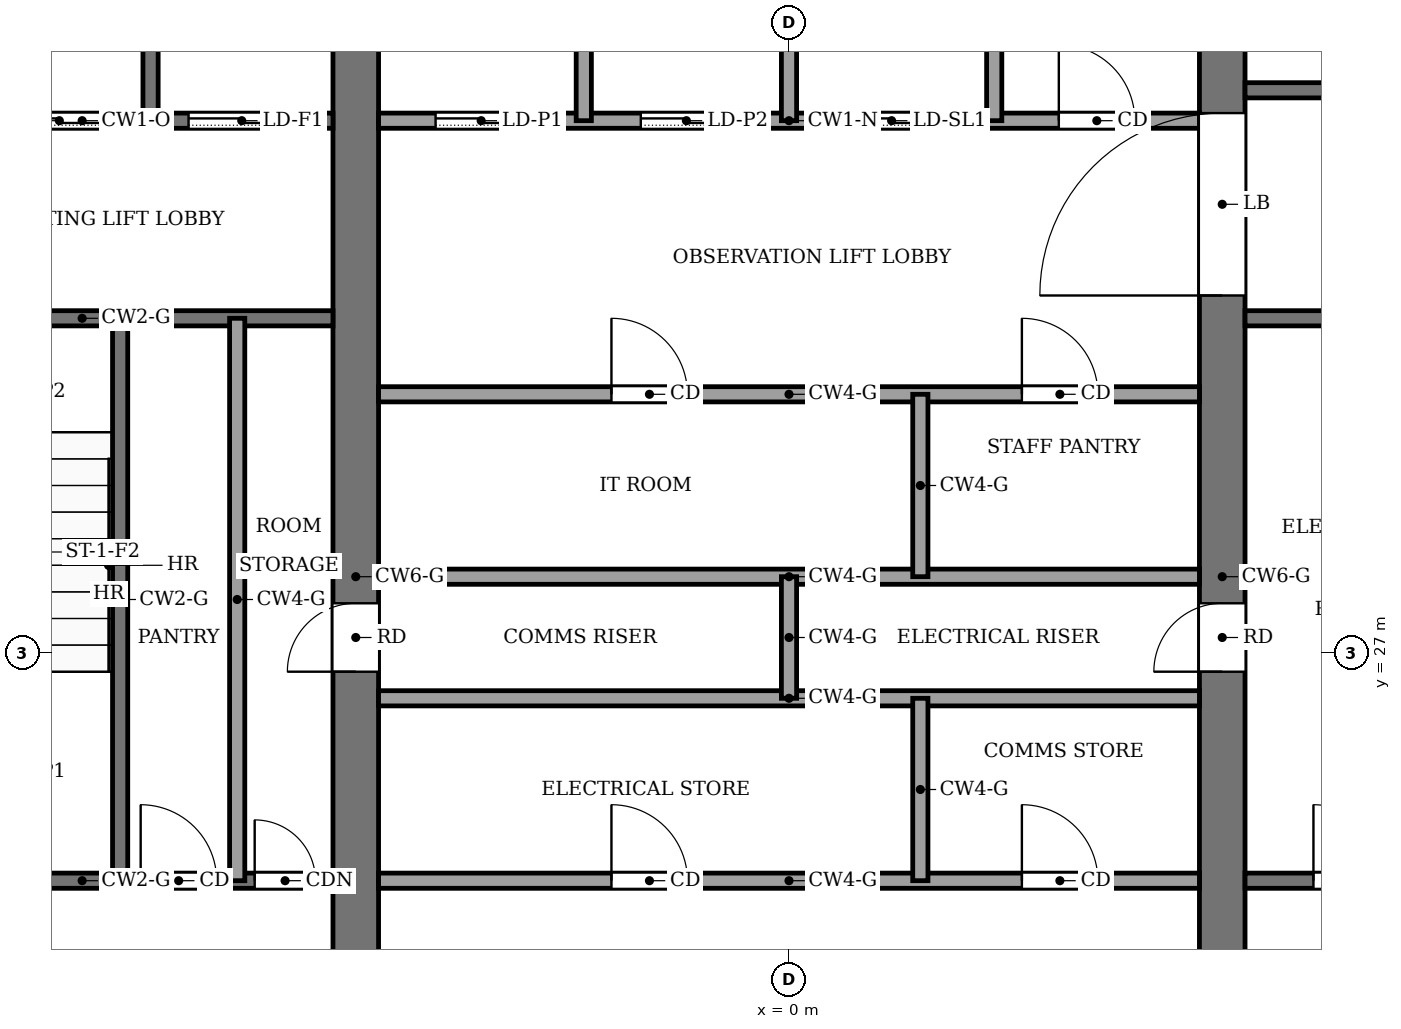
"""IFC4 building model, lengths in metres.
Left out: names, types, materials, properties, quantities, classifications, styles, units other than length and angle.
Written with IfcOpenShell. Run it as: python <this file> out.ifc"""

import sys

from ifc_helpers import new_model, si_unit, direction, frame, frame_2d, origin, place, context, subcontext, project, spatial, rectangle, extrude, element, fill, save


model = new_model("IFC4")
c1 = context("Model", 3, precision=1e-05, world=origin(), true_north=direction((0.0, 1.0)))
c2 = subcontext(c1, "Body", "Model", "MODEL_VIEW")
j1 = project(units=[si_unit("LENGTHUNIT", "METRE"), si_unit("PLANEANGLEUNIT", "RADIAN")], contexts=[c1])
p1 = place(None, origin())
s1 = spatial("IfcSite", under=j1, at=p1, CompositionType="ELEMENT")
p2 = place(p1, origin())
s2 = spatial("IfcBuilding", under=s1, at=p2, CompositionType="ELEMENT")
p3 = place(p2, frame((0.0, 0.0, 334.0)))
s3 = spatial("IfcBuildingStorey", under=s2, at=p3, CompositionType="ELEMENT", Elevation=334.0)
p4 = place(p3, frame((-5.7, 18.4, -0.18), z_axis=(0.0, 0.0, 1.0), x_axis=(0.0, 1.0, 0.0)))
e1 = element("IfcWall", 1, at=p4, inside=s3, PredefinedType="SHEAR", context=c2, shape_type="SweptSolid", body=[
    extrude(rectangle(XDim=19.2, YDim=0.6, at=frame_2d((9.6, 0.0))), origin(), (0.0, 0.0, 1.0), 6.53),
])
p5 = place(p4, frame((8.35, 0.0, 0.18)))
e2 = element("IfcOpeningElement", 2, at=p5, cuts=e1, PredefinedType="OPENING", context=c2, shape_type="SweptSolid", body=[
    extrude(rectangle(XDim=0.9, YDim=2.1, at=frame_2d((0.45, 1.05))), frame((0.0, 0.31, 0.0), z_axis=(0.0, -1.0, 0.0), x_axis=(1.0, 0.0, 0.0)), (0.0, 0.0, 1.0), 0.62),
])
p6 = place(p3, frame((5.7, 18.4, -0.18), z_axis=(0.0, 0.0, 1.0), x_axis=(0.0, 1.0, 0.0)))
e3 = element("IfcWall", 3, at=p6, inside=s3, PredefinedType="SHEAR", context=c2, shape_type="SweptSolid", body=[
    extrude(rectangle(XDim=19.2, YDim=0.6, at=frame_2d((9.6, 0.0))), origin(), (0.0, 0.0, 1.0), 6.53),
])
p7 = place(p6, frame((8.35, 0.0, 0.18)))
e4 = element("IfcOpeningElement", 4, at=p7, cuts=e3, PredefinedType="OPENING", context=c2, shape_type="SweptSolid", body=[
    extrude(rectangle(XDim=0.9, YDim=2.1, at=frame_2d((0.45, 1.05))), frame((0.0, 0.31, 0.0), z_axis=(0.0, -1.0, 0.0), x_axis=(1.0, 0.0, 0.0)), (0.0, 0.0, 1.0), 0.62),
])
p8 = place(p6, frame((13.3, 0.0, 0.18)))
e5 = element("IfcOpeningElement", 5, at=p8, cuts=e3, PredefinedType="OPENING", context=c2, shape_type="SweptSolid", body=[
    extrude(rectangle(XDim=2.4, YDim=2.4, at=frame_2d((1.2, 1.2))), frame((0.0, 0.31, 0.0), z_axis=(0.0, -1.0, 0.0), x_axis=(1.0, 0.0, 0.0)), (0.0, 0.0, 1.0), 0.62),
])
p9 = place(p3, frame((-12.6, 24.0, 0.0), z_axis=(0.0, 0.0, 1.0), x_axis=(1.0, 0.0, 0.0)))
e6 = element("IfcWall", 6, at=p9, inside=s3, PredefinedType="PARTITIONING", context=c2, shape_type="SweptSolid", body=[
    extrude(rectangle(XDim=6.6, YDim=0.2, at=frame_2d((3.3, 0.0))), origin(), (0.0, 0.0, 1.0), 6.35),
])
p10 = place(p9, frame((4.07, 0.0, 0.0)))
e7 = element("IfcOpeningElement", 7, at=p10, cuts=e6, PredefinedType="OPENING", context=c2, shape_type="SweptSolid", body=[
    extrude(rectangle(XDim=1.0, YDim=2.1, at=frame_2d((0.5, 1.05))), frame((0.0, 0.11, 0.0), z_axis=(0.0, -1.0, 0.0), x_axis=(1.0, 0.0, 0.0)), (0.0, 0.0, 1.0), 0.22),
])
p11 = place(p9, frame((5.57, 0.0, 0.0)))
e8 = element("IfcOpeningElement", 8, at=p11, cuts=e6, PredefinedType="OPENING", context=c2, shape_type="SweptSolid", body=[
    extrude(rectangle(XDim=0.8, YDim=2.1, at=frame_2d((0.4, 1.05))), frame((0.0, 0.11, 0.0), z_axis=(0.0, -1.0, 0.0), x_axis=(1.0, 0.0, 0.0)), (0.0, 0.0, 1.0), 0.22),
])
p12 = place(p3, frame((-5.4, 24.0, 0.0), z_axis=(0.0, 0.0, 1.0), x_axis=(1.0, 0.0, 0.0)))
e9 = element("IfcWall", 9, at=p12, inside=s3, PredefinedType="PARTITIONING", context=c2, shape_type="SweptSolid", body=[
    extrude(rectangle(XDim=10.8, YDim=0.2, at=frame_2d((5.4, 0.0))), origin(), (0.0, 0.0, 1.0), 6.35),
])
p13 = place(p12, frame((3.064, 0.0, 0.0)))
e10 = element("IfcOpeningElement", 10, at=p13, cuts=e9, PredefinedType="OPENING", context=c2, shape_type="SweptSolid", body=[
    extrude(rectangle(XDim=1.0, YDim=2.1, at=frame_2d((0.5, 1.05))), frame((0.0, 0.11, 0.0), z_axis=(0.0, -1.0, 0.0), x_axis=(1.0, 0.0, 0.0)), (0.0, 0.0, 1.0), 0.22),
])
p14 = place(p12, frame((8.464, 0.0, 0.0)))
e11 = element("IfcOpeningElement", 11, at=p14, cuts=e9, PredefinedType="OPENING", context=c2, shape_type="SweptSolid", body=[
    extrude(rectangle(XDim=1.0, YDim=2.1, at=frame_2d((0.5, 1.05))), frame((0.0, 0.11, 0.0), z_axis=(0.0, -1.0, 0.0), x_axis=(1.0, 0.0, 0.0)), (0.0, 0.0, 1.0), 0.22),
])
p15 = place(p3, frame((6.0, 24.0, 0.0), z_axis=(0.0, 0.0, 1.0), x_axis=(1.0, 0.0, 0.0)))
e12 = element("IfcWall", 12, at=p15, inside=s3, PredefinedType="PARTITIONING", context=c2, shape_type="SweptSolid", body=[
    extrude(rectangle(XDim=6.6, YDim=0.2, at=frame_2d((3.3, 0.0))), origin(), (0.0, 0.0, 1.0), 6.35),
])
p16 = place(p15, frame((0.9, 0.0, 0.0)))
e13 = element("IfcOpeningElement", 13, at=p16, cuts=e12, PredefinedType="OPENING", context=c2, shape_type="SweptSolid", body=[
    extrude(rectangle(XDim=1.0, YDim=2.1, at=frame_2d((0.5, 1.05))), frame((0.0, 0.11, 0.0), z_axis=(0.0, -1.0, 0.0), x_axis=(1.0, 0.0, 0.0)), (0.0, 0.0, 1.0), 0.22),
])
p17 = place(p15, frame((4.4, 0.0, 0.0)))
e14 = element("IfcOpeningElement", 14, at=p17, cuts=e12, PredefinedType="OPENING", context=c2, shape_type="SweptSolid", body=[
    extrude(rectangle(XDim=1.2, YDim=2.2, at=frame_2d((0.6, 1.1))), frame((0.0, 0.11, 0.0), z_axis=(0.0, -1.0, 0.0), x_axis=(1.0, 0.0, 0.0)), (0.0, 0.0, 1.0), 0.22),
])
for number, where, z_axis, x_axis in (
    (15, (-5.4, 26.4, 0.0), (0.0, 0.0, 1.0), (1.0, 0.0, 0.0)),
    (16, (-5.4, 28.0, 0.0), (0.0, 0.0, 1.0), (1.0, 0.0, 0.0)),
):
    element("IfcWall", number, at=place(p3, frame(where, z_axis=z_axis, x_axis=x_axis)), inside=s3, PredefinedType="PARTITIONING", context=c2, shape_type="SweptSolid", body=[
        extrude(rectangle(XDim=10.8, YDim=0.2, at=frame_2d((5.4, 0.0))), origin(), (0.0, 0.0, 1.0), 6.35),
    ])
p18 = place(p3, frame((-5.4, 30.4, 0.0), z_axis=(0.0, 0.0, 1.0), x_axis=(1.0, 0.0, 0.0)))
e17 = element("IfcWall", 17, at=p18, inside=s3, PredefinedType="PARTITIONING", context=c2, shape_type="SweptSolid", body=[
    extrude(rectangle(XDim=10.8, YDim=0.2, at=frame_2d((5.4, 0.0))), origin(), (0.0, 0.0, 1.0), 6.35),
])
p19 = place(p18, frame((3.064, 0.0, 0.0)))
e18 = element("IfcOpeningElement", 18, at=p19, cuts=e17, PredefinedType="OPENING", context=c2, shape_type="SweptSolid", body=[
    extrude(rectangle(XDim=1.0, YDim=2.1, at=frame_2d((0.5, 1.05))), frame((0.0, 0.11, 0.0), z_axis=(0.0, -1.0, 0.0), x_axis=(1.0, 0.0, 0.0)), (0.0, 0.0, 1.0), 0.22),
])
p20 = place(p18, frame((8.464, 0.0, 0.0)))
e19 = element("IfcOpeningElement", 19, at=p20, cuts=e17, PredefinedType="OPENING", context=c2, shape_type="SweptSolid", body=[
    extrude(rectangle(XDim=1.0, YDim=2.1, at=frame_2d((0.5, 1.05))), frame((0.0, 0.11, 0.0), z_axis=(0.0, -1.0, 0.0), x_axis=(1.0, 0.0, 0.0)), (0.0, 0.0, 1.0), 0.22),
])
p21 = place(p3, frame((-12.6, 31.4, 0.0), z_axis=(0.0, 0.0, 1.0), x_axis=(1.0, 0.0, 0.0)))
e20 = element("IfcWall", 20, at=p21, inside=s3, PredefinedType="PARTITIONING", context=c2, shape_type="SweptSolid", body=[
    extrude(rectangle(XDim=6.6, YDim=0.2, at=frame_2d((3.3, 0.0))), origin(), (0.0, 0.0, 1.0), 6.35),
])
p22 = place(p21, frame((1.0, 0.0, 0.0)))
e21 = element("IfcOpeningElement", 21, at=p22, cuts=e20, PredefinedType="OPENING", context=c2, shape_type="SweptSolid", body=[
    extrude(rectangle(XDim=1.2, YDim=2.2, at=frame_2d((0.6, 1.1))), frame((0.0, 0.11, 0.0), z_axis=(0.0, -1.0, 0.0), x_axis=(1.0, 0.0, 0.0)), (0.0, 0.0, 1.0), 0.22),
])
p23 = place(p3, frame((6.0, 31.4, 0.0), z_axis=(0.0, 0.0, 1.0), x_axis=(1.0, 0.0, 0.0)))
e22 = element("IfcWall", 22, at=p23, inside=s3, PredefinedType="PARTITIONING", context=c2, shape_type="SweptSolid", body=[
    extrude(rectangle(XDim=6.6, YDim=0.2, at=frame_2d((3.3, 0.0))), origin(), (0.0, 0.0, 1.0), 6.35),
])
p24 = place(p3, frame((-12.6, 34.0, 0.0), z_axis=(0.0, 0.0, 1.0), x_axis=(1.0, 0.0, 0.0)))
e23 = element("IfcWall", 23, at=p24, inside=s3, PredefinedType="PARTITIONING", context=c2, shape_type="SweptSolid", body=[
    extrude(rectangle(XDim=6.6, YDim=0.2, at=frame_2d((3.3, 0.0))), origin(), (0.0, 0.0, 1.0), 6.35),
])
p25 = place(p24, frame((4.7, 0.0, 0.0)))
e24 = element("IfcOpeningElement", 24, at=p25, cuts=e23, PredefinedType="OPENING", context=c2, shape_type="SweptSolid", body=[
    extrude(rectangle(XDim=1.4, YDim=2.2, at=frame_2d((0.7, 1.1))), frame((0.0, 0.11, 0.0), z_axis=(0.0, -1.0, 0.0), x_axis=(1.0, 0.0, 0.0)), (0.0, 0.0, 1.0), 0.22),
])
p26 = place(p24, frame((2.3, 0.0, 0.0)))
e25 = element("IfcOpeningElement", 25, at=p26, cuts=e23, PredefinedType="OPENING", context=c2, shape_type="SweptSolid", body=[
    extrude(rectangle(XDim=1.4, YDim=2.2, at=frame_2d((0.7, 1.1))), frame((0.0, 0.11, 0.0), z_axis=(0.0, -1.0, 0.0), x_axis=(1.0, 0.0, 0.0)), (0.0, 0.0, 1.0), 0.22),
])
p27 = place(p24, frame((0.45, 0.0, 0.0)))
e26 = element("IfcOpeningElement", 26, at=p27, cuts=e23, PredefinedType="OPENING", context=c2, shape_type="SweptSolid", body=[
    extrude(rectangle(XDim=0.9, YDim=2.1, at=frame_2d((0.45, 1.05))), frame((0.0, 0.11, 0.0), z_axis=(0.0, -1.0, 0.0), x_axis=(1.0, 0.0, 0.0)), (0.0, 0.0, 1.0), 0.22),
])
p28 = place(p3, frame((-5.4, 34.0, 0.0), z_axis=(0.0, 0.0, 1.0), x_axis=(1.0, 0.0, 0.0)))
e27 = element("IfcWall", 27, at=p28, inside=s3, PredefinedType="PARTITIONING", context=c2, shape_type="SweptSolid", body=[
    extrude(rectangle(XDim=10.8, YDim=0.2, at=frame_2d((5.4, 0.0))), origin(), (0.0, 0.0, 1.0), 6.35),
])
p29 = place(p28, frame((0.75, 0.0, 0.0)))
e28 = element("IfcOpeningElement", 28, at=p29, cuts=e27, PredefinedType="OPENING", context=c2, shape_type="SweptSolid", body=[
    extrude(rectangle(XDim=1.2, YDim=2.2, at=frame_2d((0.6, 1.1))), frame((0.0, 0.11, 0.0), z_axis=(0.0, -1.0, 0.0), x_axis=(1.0, 0.0, 0.0)), (0.0, 0.0, 1.0), 0.22),
])
p30 = place(p28, frame((3.45, 0.0, 0.0)))
e29 = element("IfcOpeningElement", 29, at=p30, cuts=e27, PredefinedType="OPENING", context=c2, shape_type="SweptSolid", body=[
    extrude(rectangle(XDim=1.2, YDim=2.2, at=frame_2d((0.6, 1.1))), frame((0.0, 0.11, 0.0), z_axis=(0.0, -1.0, 0.0), x_axis=(1.0, 0.0, 0.0)), (0.0, 0.0, 1.0), 0.22),
])
p31 = place(p28, frame((6.15, 0.0, 0.0)))
e30 = element("IfcOpeningElement", 30, at=p31, cuts=e27, PredefinedType="OPENING", context=c2, shape_type="SweptSolid", body=[
    extrude(rectangle(XDim=1.2, YDim=2.2, at=frame_2d((0.6, 1.1))), frame((0.0, 0.11, 0.0), z_axis=(0.0, -1.0, 0.0), x_axis=(1.0, 0.0, 0.0)), (0.0, 0.0, 1.0), 0.22),
])
p32 = place(p28, frame((8.95, 0.0, 0.0)))
e31 = element("IfcOpeningElement", 31, at=p32, cuts=e27, PredefinedType="OPENING", context=c2, shape_type="SweptSolid", body=[
    extrude(rectangle(XDim=1.0, YDim=2.1, at=frame_2d((0.5, 1.05))), frame((0.0, 0.11, 0.0), z_axis=(0.0, -1.0, 0.0), x_axis=(1.0, 0.0, 0.0)), (0.0, 0.0, 1.0), 0.22),
])
p33 = place(p3, frame((6.0, 34.4, 0.0), z_axis=(0.0, 0.0, 1.0), x_axis=(1.0, 0.0, 0.0)))
e32 = element("IfcWall", 32, at=p33, inside=s3, PredefinedType="PARTITIONING", context=c2, shape_type="SweptSolid", body=[
    extrude(rectangle(XDim=6.6, YDim=0.2, at=frame_2d((3.3, 0.0))), origin(), (0.0, 0.0, 1.0), 6.35),
])
p34 = place(p33, frame((4.8, 0.0, 0.0)))
e33 = element("IfcOpeningElement", 33, at=p34, cuts=e32, PredefinedType="OPENING", context=c2, shape_type="SweptSolid", body=[
    extrude(rectangle(XDim=1.2, YDim=2.2, at=frame_2d((0.6, 1.1))), frame((0.0, 0.11, 0.0), z_axis=(0.0, -1.0, 0.0), x_axis=(1.0, 0.0, 0.0)), (0.0, 0.0, 1.0), 0.22),
])
p35 = place(p3, frame((-8.8, 24.0, 0.0), z_axis=(0.0, 0.0, 1.0), x_axis=(0.0, 1.0, 0.0)))
e34 = element("IfcWall", 34, at=p35, inside=s3, PredefinedType="PARTITIONING", context=c2, shape_type="SweptSolid", body=[
    extrude(rectangle(XDim=7.4, YDim=0.2, at=frame_2d((3.7, 0.0))), origin(), (0.0, 0.0, 1.0), 6.35),
])
p36 = place(p3, frame((-8.4, 34.0, 0.0), z_axis=(0.0, 0.0, 1.0), x_axis=(0.0, 1.0, 0.0)))
e35 = element("IfcWall", 35, at=p36, inside=s3, PredefinedType="PARTITIONING", context=c2, shape_type="SweptSolid", body=[
    extrude(rectangle(XDim=3.6, YDim=0.2, at=frame_2d((1.8, 0.0))), origin(), (0.0, 0.0, 1.0), 6.35),
])
p37 = place(p3, frame((-7.26, 24.0, 0.0), z_axis=(0.0, 0.0, 1.0), x_axis=(0.0, 1.0, 0.0)))
e36 = element("IfcWall", 36, at=p37, inside=s3, PredefinedType="PARTITIONING", context=c2, shape_type="SweptSolid", body=[
    extrude(rectangle(XDim=7.4, YDim=0.2, at=frame_2d((3.7, 0.0))), origin(), (0.0, 0.0, 1.0), 6.35),
])
p38 = place(p3, frame((-2.7, 34.0, 0.0), z_axis=(0.0, 0.0, 1.0), x_axis=(0.0, 1.0, 0.0)))
e37 = element("IfcWall", 37, at=p38, inside=s3, PredefinedType="PARTITIONING", context=c2, shape_type="SweptSolid", body=[
    extrude(rectangle(XDim=3.6, YDim=0.2, at=frame_2d((1.8, 0.0))), origin(), (0.0, 0.0, 1.0), 6.35),
])
p39 = place(p3, frame((0.0, 26.4, 0.0), z_axis=(0.0, 0.0, 1.0), x_axis=(0.0, 1.0, 0.0)))
e38 = element("IfcWall", 38, at=p39, inside=s3, PredefinedType="PARTITIONING", context=c2, shape_type="SweptSolid", body=[
    extrude(rectangle(XDim=1.6, YDim=0.2, at=frame_2d((0.8, 0.0))), origin(), (0.0, 0.0, 1.0), 6.35),
])
p40 = place(p3, frame((0.0, 34.0, 0.0), z_axis=(0.0, 0.0, 1.0), x_axis=(0.0, 1.0, 0.0)))
e39 = element("IfcWall", 39, at=p40, inside=s3, PredefinedType="PARTITIONING", context=c2, shape_type="SweptSolid", body=[
    extrude(rectangle(XDim=3.6, YDim=0.2, at=frame_2d((1.8, 0.0))), origin(), (0.0, 0.0, 1.0), 6.35),
])
for number, where, z_axis, x_axis in (
    (40, (1.728, 24.0, 0.0), (0.0, 0.0, 1.0), (0.0, 1.0, 0.0)),
    (41, (1.728, 28.0, 0.0), (0.0, 0.0, 1.0), (0.0, 1.0, 0.0)),
):
    element("IfcWall", number, at=place(p3, frame(where, z_axis=z_axis, x_axis=x_axis)), inside=s3, PredefinedType="PARTITIONING", context=c2, shape_type="SweptSolid", body=[
        extrude(rectangle(XDim=2.4, YDim=0.2, at=frame_2d((1.2, 0.0))), origin(), (0.0, 0.0, 1.0), 6.35),
    ])
p41 = place(p3, frame((2.7, 34.0, 0.0), z_axis=(0.0, 0.0, 1.0), x_axis=(0.0, 1.0, 0.0)))
e42 = element("IfcWall", 42, at=p41, inside=s3, PredefinedType="PARTITIONING", context=c2, shape_type="SweptSolid", body=[
    extrude(rectangle(XDim=3.6, YDim=0.2, at=frame_2d((1.8, 0.0))), origin(), (0.0, 0.0, 1.0), 6.35),
])
p42 = place(p29, origin())
e43 = element("IfcDoor", 43, at=p42, inside=s3, OperationType="SLIDING_TO_LEFT", PredefinedType="DOOR", context=c2, shape_type="SweptSolid", body=[
    extrude(rectangle(XDim=1.2, YDim=2.2, at=frame_2d((0.6, 1.1))), frame((0.0, 0.025, 0.0), z_axis=(0.0, -1.0, 0.0), x_axis=(1.0, 0.0, 0.0)), (0.0, 0.0, 1.0), 0.05),
])
fill(e28, e43)
p43 = place(p30, origin())
e44 = element("IfcDoor", 44, at=p43, inside=s3, OperationType="SLIDING_TO_LEFT", PredefinedType="DOOR", context=c2, shape_type="SweptSolid", body=[
    extrude(rectangle(XDim=1.2, YDim=2.2, at=frame_2d((0.6, 1.1))), frame((0.0, 0.025, 0.0), z_axis=(0.0, -1.0, 0.0), x_axis=(1.0, 0.0, 0.0)), (0.0, 0.0, 1.0), 0.05),
])
fill(e29, e44)
p44 = place(p31, origin())
e45 = element("IfcDoor", 45, at=p44, inside=s3, OperationType="SLIDING_TO_LEFT", PredefinedType="DOOR", context=c2, shape_type="SweptSolid", body=[
    extrude(rectangle(XDim=1.2, YDim=2.2, at=frame_2d((0.6, 1.1))), frame((0.0, 0.025, 0.0), z_axis=(0.0, -1.0, 0.0), x_axis=(1.0, 0.0, 0.0)), (0.0, 0.0, 1.0), 0.05),
])
fill(e30, e45)
p45 = place(p25, origin())
e46 = element("IfcDoor", 46, at=p45, inside=s3, OperationType="SLIDING_TO_LEFT", PredefinedType="DOOR", context=c2, shape_type="SweptSolid", body=[
    extrude(rectangle(XDim=1.4, YDim=2.2, at=frame_2d((0.7, 1.1))), frame((0.0, 0.025, 0.0), z_axis=(0.0, -1.0, 0.0), x_axis=(1.0, 0.0, 0.0)), (0.0, 0.0, 1.0), 0.05),
])
fill(e24, e46)
p46 = place(p26, origin())
e47 = element("IfcDoor", 47, at=p46, inside=s3, OperationType="SLIDING_TO_LEFT", PredefinedType="DOOR", context=c2, shape_type="SweptSolid", body=[
    extrude(rectangle(XDim=1.4, YDim=2.2, at=frame_2d((0.7, 1.1))), frame((0.0, 0.025, 0.0), z_axis=(0.0, -1.0, 0.0), x_axis=(1.0, 0.0, 0.0)), (0.0, 0.0, 1.0), 0.05),
])
fill(e25, e47)
p47 = place(p13, origin())
e48 = element("IfcDoor", 48, at=p47, inside=s3, OperationType="SINGLE_SWING_RIGHT", PredefinedType="DOOR", context=c2, shape_type="SweptSolid", body=[
    extrude(rectangle(XDim=1.0, YDim=2.1, at=frame_2d((0.5, 1.05))), frame((0.0, 0.025, 0.0), z_axis=(0.0, -1.0, 0.0), x_axis=(1.0, 0.0, 0.0)), (0.0, 0.0, 1.0), 0.05),
])
fill(e10, e48)
p48 = place(p14, origin())
e49 = element("IfcDoor", 49, at=p48, inside=s3, OperationType="SINGLE_SWING_LEFT", PredefinedType="DOOR", context=c2, shape_type="SweptSolid", body=[
    extrude(rectangle(XDim=1.0, YDim=2.1, at=frame_2d((0.5, 1.05))), frame((0.0, 0.025, 0.0), z_axis=(0.0, -1.0, 0.0), x_axis=(1.0, 0.0, 0.0)), (0.0, 0.0, 1.0), 0.05),
])
fill(e11, e49)
p49 = place(p19, origin())
e50 = element("IfcDoor", 50, at=p49, inside=s3, OperationType="SINGLE_SWING_RIGHT", PredefinedType="DOOR", context=c2, shape_type="SweptSolid", body=[
    extrude(rectangle(XDim=1.0, YDim=2.1, at=frame_2d((0.5, 1.05))), frame((0.0, 0.025, 0.0), z_axis=(0.0, -1.0, 0.0), x_axis=(1.0, 0.0, 0.0)), (0.0, 0.0, 1.0), 0.05),
])
fill(e18, e50)
p50 = place(p20, origin())
e51 = element("IfcDoor", 51, at=p50, inside=s3, OperationType="SINGLE_SWING_LEFT", PredefinedType="DOOR", context=c2, shape_type="SweptSolid", body=[
    extrude(rectangle(XDim=1.0, YDim=2.1, at=frame_2d((0.5, 1.05))), frame((0.0, 0.025, 0.0), z_axis=(0.0, -1.0, 0.0), x_axis=(1.0, 0.0, 0.0)), (0.0, 0.0, 1.0), 0.05),
])
fill(e19, e51)
p51 = place(p10, origin())
e52 = element("IfcDoor", 52, at=p51, inside=s3, OperationType="SINGLE_SWING_RIGHT", PredefinedType="DOOR", context=c2, shape_type="SweptSolid", body=[
    extrude(rectangle(XDim=1.0, YDim=2.1, at=frame_2d((0.5, 1.05))), frame((0.0, 0.025, 0.0), z_axis=(0.0, -1.0, 0.0), x_axis=(1.0, 0.0, 0.0)), (0.0, 0.0, 1.0), 0.05),
])
fill(e7, e52)
p52 = place(p11, origin())
e53 = element("IfcDoor", 53, at=p52, inside=s3, OperationType="SINGLE_SWING_LEFT", PredefinedType="DOOR", context=c2, shape_type="SweptSolid", body=[
    extrude(rectangle(XDim=0.8, YDim=2.1, at=frame_2d((0.4, 1.05))), frame((0.0, 0.025, 0.0), z_axis=(0.0, -1.0, 0.0), x_axis=(1.0, 0.0, 0.0)), (0.0, 0.0, 1.0), 0.05),
])
fill(e8, e53)
p53 = place(p16, origin())
e54 = element("IfcDoor", 54, at=p53, inside=s3, OperationType="SINGLE_SWING_RIGHT", PredefinedType="DOOR", context=c2, shape_type="SweptSolid", body=[
    extrude(rectangle(XDim=1.0, YDim=2.1, at=frame_2d((0.5, 1.05))), frame((0.0, 0.025, 0.0), z_axis=(0.0, -1.0, 0.0), x_axis=(1.0, 0.0, 0.0)), (0.0, 0.0, 1.0), 0.05),
])
fill(e13, e54)
p54 = place(p32, origin())
e55 = element("IfcDoor", 55, at=p54, inside=s3, OperationType="SINGLE_SWING_LEFT", PredefinedType="DOOR", context=c2, shape_type="SweptSolid", body=[
    extrude(rectangle(XDim=1.0, YDim=2.1, at=frame_2d((0.5, 1.05))), frame((0.0, 0.025, 0.0), z_axis=(0.0, -1.0, 0.0), x_axis=(1.0, 0.0, 0.0)), (0.0, 0.0, 1.0), 0.05),
])
fill(e31, e55)
p55 = place(p5, origin())
e56 = element("IfcDoor", 56, at=p55, inside=s3, OperationType="SINGLE_SWING_LEFT", PredefinedType="DOOR", context=c2, shape_type="SweptSolid", body=[
    extrude(rectangle(XDim=0.9, YDim=2.1, at=frame_2d((0.45, 1.05))), frame((0.0, 0.025, 0.0), z_axis=(0.0, -1.0, 0.0), x_axis=(1.0, 0.0, 0.0)), (0.0, 0.0, 1.0), 0.05),
])
fill(e2, e56)
p56 = place(p7, origin())
e57 = element("IfcDoor", 57, at=p56, inside=s3, OperationType="SINGLE_SWING_RIGHT", PredefinedType="DOOR", context=c2, shape_type="SweptSolid", body=[
    extrude(rectangle(XDim=0.9, YDim=2.1, at=frame_2d((0.45, 1.05))), frame((0.0, 0.025, 0.0), z_axis=(0.0, -1.0, 0.0), x_axis=(1.0, 0.0, 0.0)), (0.0, 0.0, 1.0), 0.05),
])
fill(e4, e57)
p57 = place(p8, origin())
e58 = element("IfcDoor", 58, at=p57, inside=s3, OperationType="DOUBLE_DOOR_SINGLE_SWING", PredefinedType="DOOR", context=c2, shape_type="SweptSolid", body=[
    extrude(rectangle(XDim=2.4, YDim=2.4, at=frame_2d((1.2, 1.2))), frame((0.0, 0.025, 0.0), z_axis=(0.0, -1.0, 0.0), x_axis=(1.0, 0.0, 0.0)), (0.0, 0.0, 1.0), 0.05),
])
fill(e5, e58)
save(model, sys.argv[1])
